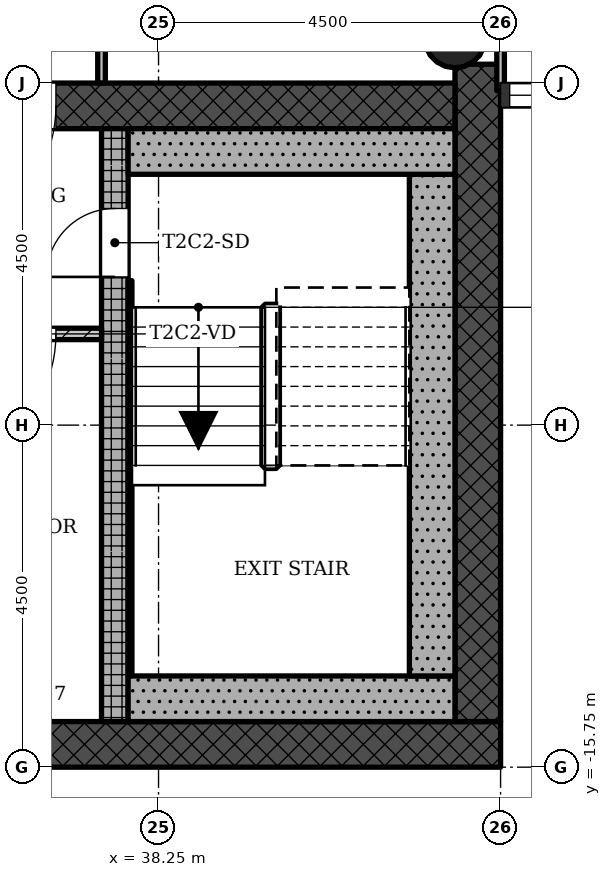
"""IFC4 building model, lengths in metres.
Left out: names, types, materials, properties, quantities, classifications, styles, units other than length and angle.
Written with IfcOpenShell. Run it as: python <this file> out.ifc"""

import sys

from ifc_helpers import new_model, si_unit, direction, frame, frame_2d, origin, origin_2d, place, context, subcontext, project, spatial, rectangle, hollow_circle, extrude, element, fill, save


model = new_model("IFC4")
c1 = context("Model", 3, precision=1e-05, world=origin(), true_north=direction((0.0, 1.0)))
c2 = subcontext(c1, "Body", "Model", "MODEL_VIEW")
j1 = project(units=[si_unit("LENGTHUNIT", "METRE"), si_unit("PLANEANGLEUNIT", "RADIAN")], contexts=[c1])
p1 = place(None, origin())
s1 = spatial("IfcSite", under=j1, at=p1, CompositionType="ELEMENT")
p2 = place(p1, origin())
s2 = spatial("IfcBuilding", under=s1, at=p2, CompositionType="ELEMENT")
p3 = place(p2, frame((0.0, 0.0, 206.2)))
s3 = spatial("IfcBuildingStorey", under=s2, at=p3, CompositionType="ELEMENT", Elevation=206.2)
p4 = place(p3, frame((29.85, -15.45, 0.0), z_axis=(0.0, 0.0, 1.0), x_axis=(1.0, 0.0, 0.0)))
e1 = element("IfcWall", 1, at=p4, inside=s3, PredefinedType="SHEAR", context=c2, shape_type="SweptSolid", body=[
    extrude(rectangle(XDim=12.9, YDim=0.6, at=frame_2d((6.45, 0.0))), origin(), (0.0, 0.0, 1.0), 3.4),
])
p5 = place(p4, frame((5.7, 0.0, 0.45)))
e2 = element("IfcOpeningElement", 2, at=p5, cuts=e1, PredefinedType="OPENING", context=c2, shape_type="SweptSolid", body=[
    extrude(rectangle(XDim=0.9, YDim=2.4, at=frame_2d((0.45, 1.2))), frame((0.0, 0.31, 0.0), z_axis=(0.0, -1.0, 0.0), x_axis=(1.0, 0.0, 0.0)), (0.0, 0.0, 1.0), 0.62),
])
p6 = place(p3, frame((42.45, -15.15, 0.0), z_axis=(0.0, 0.0, 1.0), x_axis=(0.0, 1.0, 0.0)))
e3 = element("IfcWall", 3, at=p6, inside=s3, PredefinedType="SHEAR", context=c2, shape_type="SweptSolid", body=[
    extrude(rectangle(XDim=8.648, YDim=0.6, at=frame_2d((4.324, 0.0))), origin(), (0.0, 0.0, 1.0), 3.4),
])
p7 = place(p3, frame((42.15, -7.05, 0.0), z_axis=(0.0, 0.0, 1.0), x_axis=(-1.0, 0.0, 0.0)))
e4 = element("IfcWall", 4, at=p7, inside=s3, PredefinedType="SHEAR", context=c2, shape_type="SweptSolid", body=[
    extrude(rectangle(XDim=12.9, YDim=0.6, at=frame_2d((6.45, 0.0))), origin(), (0.0, 0.0, 1.0), 3.4),
])
p8 = place(p7, frame((5.25, 0.0, 0.0)))
e5 = element("IfcOpeningElement", 5, at=p8, cuts=e4, PredefinedType="OPENING", context=c2, shape_type="SweptSolid", body=[
    extrude(rectangle(XDim=1.8, YDim=2.1, at=frame_2d((0.9, 1.05))), frame((0.0, 0.31, 0.0), z_axis=(0.0, -1.0, 0.0), x_axis=(1.0, 0.0, 0.0)), (0.0, 0.0, 1.0), 0.62),
])
p9 = place(p3, frame((37.675, -15.15, 0.0), z_axis=(0.0, 0.0, 1.0), x_axis=(0.0, 1.0, 0.0)))
e6 = element("IfcWall", 6, at=p9, inside=s3, PredefinedType="SHEAR", context=c2, shape_type="SweptSolid", body=[
    extrude(rectangle(XDim=7.8, YDim=0.35, at=frame_2d((3.9, 0.0))), origin(), (0.0, 0.0, 1.0), 3.4),
])
p10 = place(p9, frame((5.85, 0.0, 0.0)))
e7 = element("IfcOpeningElement", 7, at=p10, cuts=e6, PredefinedType="OPENING", context=c2, shape_type="SweptSolid", body=[
    extrude(rectangle(XDim=0.9, YDim=2.1, at=frame_2d((0.45, 1.05))), frame((0.0, 0.185, 0.0), z_axis=(0.0, -1.0, 0.0), x_axis=(1.0, 0.0, 0.0)), (0.0, 0.0, 1.0), 0.37),
])
p11 = place(p3, frame((42.15, -6.15, 0.0), z_axis=(0.0, 0.0, 1.0), x_axis=(1.0, 0.0, 0.0)))
e8 = element("IfcColumn", 8, at=p11, inside=s3, PredefinedType="COLUMN", context=c2, shape_type="SweptSolid", body=[
    extrude(hollow_circle(Radius=0.4, WallThickness=0.028, at=origin_2d()), origin(), (0.0, 0.0, 1.0), 3.4),
])
p12 = place(p3, frame((34.5, -10.05, 0.0), z_axis=(0.0, 0.0, 1.0), x_axis=(1.0, 0.0, 0.0)))
e9 = element("IfcWall", 9, at=p12, inside=s3, PredefinedType="PARTITIONING", context=c2, shape_type="SweptSolid", body=[
    extrude(rectangle(XDim=3.0, YDim=0.15, at=frame_2d((1.5, 0.0))), origin(), (0.0, 0.0, 1.0), 3.0),
])
p13 = place(p12, frame((0.6, 0.0, 0.0)))
e10 = element("IfcOpeningElement", 10, at=p13, cuts=e9, PredefinedType="OPENING", context=c2, shape_type="SweptSolid", body=[
    extrude(rectangle(XDim=1.8, YDim=2.1, at=frame_2d((0.9, 1.05))), frame((0.0, 0.085, 0.0), z_axis=(0.0, -1.0, 0.0), x_axis=(1.0, 0.0, 0.0)), (0.0, 0.0, 1.0), 0.17),
])
p14 = place(p3, frame((42.75, -6.85, 0.0), z_axis=(0.0, 0.0, 1.0), x_axis=(0.0, 1.0, 0.0)))
e11 = element("IfcWall", 11, at=p14, inside=s3, PredefinedType="PARTITIONING", context=c2, shape_type="SweptSolid", body=[
    extrude(rectangle(XDim=5.95, YDim=0.1, at=frame_2d((2.975, 0.0))), origin(), (0.0, 0.0, 1.0), 3.0),
])
p15 = place(p3, frame((37.5, -6.75, 0.0), z_axis=(0.0, 0.0, 1.0), x_axis=(0.0, 1.0, 0.0)))
e12 = element("IfcWall", 12, at=p15, inside=s3, PredefinedType="PARTITIONING", context=c2, shape_type="SweptSolid", body=[
    extrude(rectangle(XDim=2.25, YDim=0.1, at=frame_2d((1.125, 0.0))), origin(), (0.0, 0.0, 1.0), 3.0),
])
p16 = place(p3, frame((37.85, -14.85, 0.0), z_axis=(0.0, 0.0, 1.0), x_axis=(1.0, 0.0, 0.0)))
e13 = element("IfcWall", 13, at=p16, inside=s3, PredefinedType="SHEAR", context=c2, shape_type="SweptSolid", body=[
    extrude(rectangle(XDim=4.3, YDim=0.6, at=frame_2d((2.15, 0.0))), origin(), (0.0, 0.0, 1.0), 3.4),
])
p17 = place(p3, frame((41.85, -7.95, 0.0), z_axis=(0.0, 0.0, 1.0), x_axis=(0.0, -1.0, 0.0)))
e14 = element("IfcWall", 14, at=p17, inside=s3, PredefinedType="SHEAR", context=c2, shape_type="SweptSolid", body=[
    extrude(rectangle(XDim=6.6, YDim=0.6, at=frame_2d((3.3, 0.0))), origin(), (0.0, 0.0, 1.0), 3.4),
])
p18 = place(p3, frame((37.85, -7.65, 0.0), z_axis=(0.0, 0.0, 1.0), x_axis=(1.0, 0.0, 0.0)))
e15 = element("IfcWall", 15, at=p18, inside=s3, PredefinedType="SHEAR", context=c2, shape_type="SweptSolid", body=[
    extrude(rectangle(XDim=4.3, YDim=0.6, at=frame_2d((2.15, 0.0))), origin(), (0.0, 0.0, 1.0), 3.4),
])
p19 = place(p3, frame((37.875, -9.35, 0.0), z_axis=(0.0, 0.0, 1.0), x_axis=(0.0, -1.0, 0.0)))
e16 = element("IfcWall", 16, at=p19, inside=s3, PredefinedType="SHEAR", context=c2, shape_type="SweptSolid", body=[
    extrude(rectangle(XDim=5.2, YDim=0.05, at=frame_2d((2.6, 0.0))), origin(), (0.0, 0.0, 1.0), 3.4),
])
p20 = place(p13, origin())
e17 = element("IfcDoor", 17, at=p20, inside=s3, OperationType="SINGLE_SWING_LEFT", PredefinedType="DOOR", context=c2, shape_type="SweptSolid", body=[
    extrude(rectangle(XDim=1.8, YDim=2.1, at=frame_2d((0.9, 1.05))), frame((0.0, 0.025, 0.0), z_axis=(0.0, -1.0, 0.0), x_axis=(1.0, 0.0, 0.0)), (0.0, 0.0, 1.0), 0.05),
])
fill(e10, e17)
p21 = place(p10, origin())
e18 = element("IfcDoor", 18, at=p21, inside=s3, OperationType="SINGLE_SWING_RIGHT", PredefinedType="DOOR", context=c2, shape_type="SweptSolid", body=[
    extrude(rectangle(XDim=0.9, YDim=2.1, at=frame_2d((0.45, 1.05))), frame((0.0, 0.025, 0.0), z_axis=(0.0, -1.0, 0.0), x_axis=(1.0, 0.0, 0.0)), (0.0, 0.0, 1.0), 0.05),
])
fill(e7, e18)
p22 = place(p8, origin())
e19 = element("IfcDoor", 19, at=p22, inside=s3, OperationType="SINGLE_SWING_LEFT", PredefinedType="DOOR", context=c2, shape_type="SweptSolid", body=[
    extrude(rectangle(XDim=1.8, YDim=2.1, at=frame_2d((0.9, 1.05))), frame((0.0, 0.025, 0.0), z_axis=(0.0, -1.0, 0.0), x_axis=(1.0, 0.0, 0.0)), (0.0, 0.0, 1.0), 0.05),
])
fill(e5, e19)
save(model, sys.argv[1])
